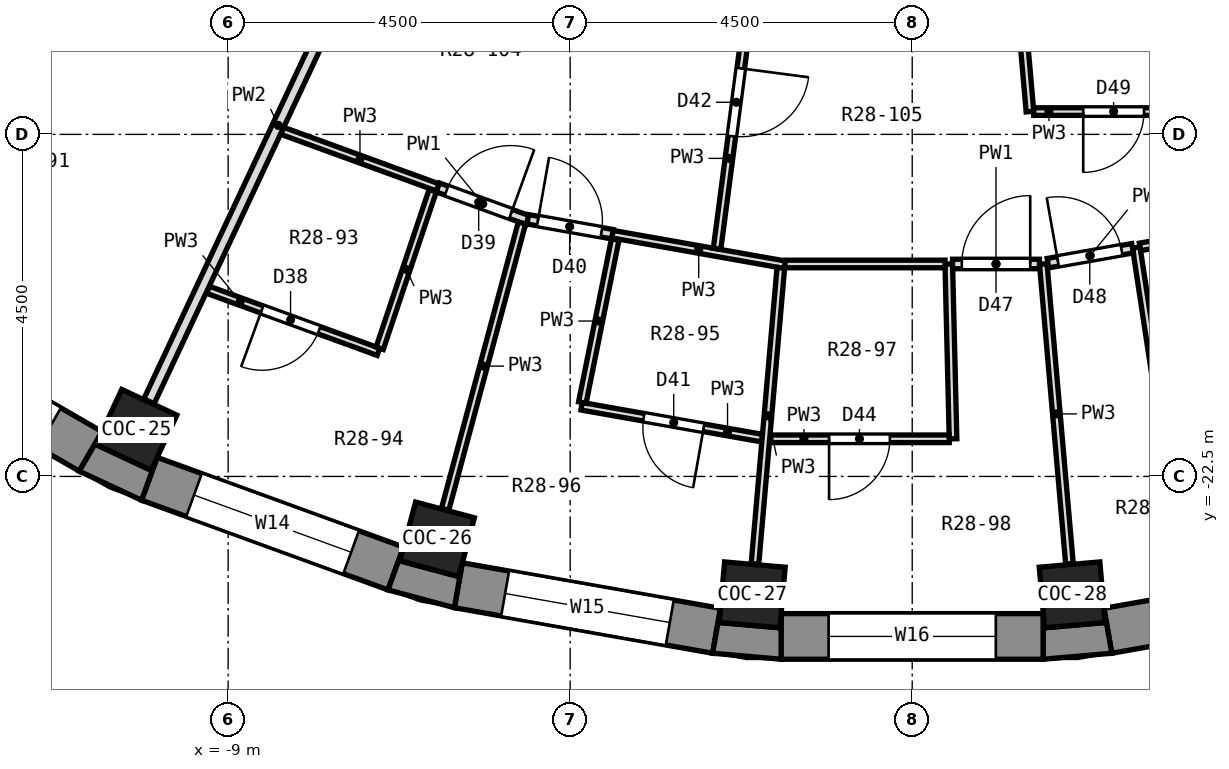
"""IFC4 building model, lengths in metres.
Left out: names, types, materials, properties, quantities, classifications, styles, units other than length and angle.
Written with IfcOpenShell. Run it as: python <this file> out.ifc"""

import sys

from ifc_helpers import new_model, si_unit, direction, frame, frame_2d, origin, origin_2d, place, context, subcontext, project, spatial, polyline, rectangle, outline, extrude, element, fill, save


model = new_model("IFC4")
c1 = context("Model", 3, precision=1e-05, world=origin(), true_north=direction((0.0, 1.0)))
c2 = subcontext(c1, "Body", "Model", "MODEL_VIEW")
j1 = project(units=[si_unit("LENGTHUNIT", "METRE"), si_unit("PLANEANGLEUNIT", "RADIAN")], contexts=[c1])
p1 = place(None, origin())
s1 = spatial("IfcSite", under=j1, at=p1, CompositionType="ELEMENT")
p2 = place(p1, origin())
s2 = spatial("IfcBuilding", under=s1, at=p2, CompositionType="ELEMENT")
p3 = place(p2, frame((0.0, 0.0, 190.5)))
s3 = spatial("IfcBuildingStorey", under=s2, at=p3, CompositionType="ELEMENT", Elevation=190.5)
for number, where, z_axis, x_axis in (
    (1, (-10.206, -21.887, 0.0), (0.0, 0.0, 1.0), (-0.423, -0.906, 0.0)),
    (2, (-6.25, -23.327, 0.0), (0.0, 0.0, 1.0), (-0.259, -0.966, 0.0)),
    (3, (-2.105, -24.058, 0.0), (0.0, 0.0, 1.0), (-0.087, -0.996, 0.0)),
    (4, (2.105, -24.058, 0.0), (0.0, 0.0, 1.0), (0.087, -0.996, 0.0)),
):
    element("IfcColumn", number, at=place(p3, frame(where, z_axis=z_axis, x_axis=x_axis)), inside=s3, PredefinedType="COLUMN", context=c2, shape_type="SweptSolid", body=[
        extrude(rectangle(XDim=0.8, YDim=0.8, at=origin_2d()), origin(), (0.0, 0.0, 1.0), 3.3),
    ])
p4 = place(p3, frame((-13.796, -20.446, 0.0), z_axis=(0.0, 0.0, 1.0), x_axis=(0.86602648383, -0.499998129301, 0.0)))
e5 = element("IfcWall", 5, at=p4, inside=s3, PredefinedType="SOLIDWALL", context=c2, shape_type="SweptSolid", body=[
    extrude(rectangle(XDim=3.45, YDim=0.6, at=frame_2d((1.725, 0.0))), origin(), (0.0, 0.0, 1.0), 2.85),
])
p5 = place(p4, frame((0.625, 0.0, 0.9)))
e6 = element("IfcOpeningElement", 6, at=p5, cuts=e5, PredefinedType="OPENING", context=c2, shape_type="SweptSolid", body=[
    extrude(rectangle(XDim=2.2, YDim=1.8, at=frame_2d((1.1, 0.9))), frame((0.0, 0.312, 0.0), z_axis=(0.0, -1.0, 0.0), x_axis=(1.0, 0.0, 0.0)), (0.0, 0.0, 1.0), 0.624),
])
p6 = place(p3, frame((-10.036, -22.531, 0.0), z_axis=(0.0, 0.0, 1.0), x_axis=(0.93968799822, -0.342032843455, 0.0)))
e7 = element("IfcWall", 7, at=p6, inside=s3, PredefinedType="SOLIDWALL", context=c2, shape_type="SweptSolid", body=[
    extrude(rectangle(XDim=3.45, YDim=0.6, at=frame_2d((1.725, 0.0))), origin(), (0.0, 0.0, 1.0), 2.85),
])
p7 = place(p6, frame((0.625, 0.0, 0.9)))
e8 = element("IfcOpeningElement", 8, at=p7, cuts=e7, PredefinedType="OPENING", context=c2, shape_type="SweptSolid", body=[
    extrude(rectangle(XDim=2.2, YDim=1.8, at=frame_2d((1.1, 0.9))), frame((0.0, 0.312, 0.0), z_axis=(0.0, -1.0, 0.0), x_axis=(1.0, 0.0, 0.0)), (0.0, 0.0, 1.0), 0.624),
])
p8 = place(p3, frame((-5.971, -23.932, 0.0), z_axis=(0.0, 0.0, 1.0), x_axis=(0.984814892183, -0.173607684551, 0.0)))
e9 = element("IfcWall", 9, at=p8, inside=s3, PredefinedType="SOLIDWALL", context=c2, shape_type="SweptSolid", body=[
    extrude(rectangle(XDim=3.45, YDim=0.6, at=frame_2d((1.725, 0.0))), origin(), (0.0, 0.0, 1.0), 2.85),
])
p9 = place(p8, frame((0.625, 0.0, 0.9)))
e10 = element("IfcOpeningElement", 10, at=p9, cuts=e9, PredefinedType="OPENING", context=c2, shape_type="SweptSolid", body=[
    extrude(rectangle(XDim=2.2, YDim=1.8, at=frame_2d((1.1, 0.9))), frame((0.0, 0.312, 0.0), z_axis=(0.0, -1.0, 0.0), x_axis=(1.0, 0.0, 0.0)), (0.0, 0.0, 1.0), 0.624),
])
p10 = place(p3, frame((-1.725, -24.605, 0.0), z_axis=(0.0, 0.0, 1.0), x_axis=(1.0, 0.0, 0.0)))
e11 = element("IfcWall", 11, at=p10, inside=s3, PredefinedType="SOLIDWALL", context=c2, shape_type="SweptSolid", body=[
    extrude(rectangle(XDim=3.45, YDim=0.6, at=frame_2d((1.725, 0.0))), origin(), (0.0, 0.0, 1.0), 2.85),
])
p11 = place(p10, frame((0.625, 0.0, 0.9)))
e12 = element("IfcOpeningElement", 12, at=p11, cuts=e11, PredefinedType="OPENING", context=c2, shape_type="SweptSolid", body=[
    extrude(rectangle(XDim=2.2, YDim=1.8, at=frame_2d((1.1, 0.9))), frame((0.0, 0.312, 0.0), z_axis=(0.0, -1.0, 0.0), x_axis=(1.0, 0.0, 0.0)), (0.0, 0.0, 1.0), 0.624),
])
p12 = place(p3, frame((2.574, -24.531, 0.0), z_axis=(0.0, 0.0, 1.0), x_axis=(0.984814892183, 0.173607684551, 0.0)))
e13 = element("IfcWall", 13, at=p12, inside=s3, PredefinedType="SOLIDWALL", context=c2, shape_type="SweptSolid", body=[
    extrude(rectangle(XDim=3.45, YDim=0.6, at=frame_2d((1.725, 0.0))), origin(), (0.0, 0.0, 1.0), 2.85),
])
p13 = place(p12, frame((0.625, 0.0, 0.9)))
e14 = element("IfcOpeningElement", 14, at=p13, cuts=e13, PredefinedType="OPENING", context=c2, shape_type="SweptSolid", body=[
    extrude(rectangle(XDim=2.2, YDim=1.8, at=frame_2d((1.1, 0.9))), frame((0.0, 0.312, 0.0), z_axis=(0.0, -1.0, 0.0), x_axis=(1.0, 0.0, 0.0)), (0.0, 0.0, 1.0), 0.624),
])
p14 = place(p3, origin())
e15 = element("IfcWall", 15, at=p14, inside=s3, PredefinedType="SOLIDWALL", context=c2, shape_type="SweptSolid", body=[
    extrude(outline(polyline([(-10.139, -22.813), (-9.934, -22.249), (-10.013, -22.419), (-10.738, -22.081), (-10.659, -21.911), (-10.959, -22.431), (-10.139, -22.813)])), origin(), (0.0, 0.0, 1.0), 2.85),
])
p15 = place(p3, origin())
e16 = element("IfcWall", 16, at=p15, inside=s3, PredefinedType="SOLIDWALL", context=c2, shape_type="SweptSolid", body=[
    extrude(outline(polyline([(-6.023, -24.227), (-5.919, -23.636), (-5.968, -23.817), (-6.74, -23.61), (-6.692, -23.429), (-6.897, -23.993), (-6.023, -24.227)])), origin(), (0.0, 0.0, 1.0), 2.85),
])
p16 = place(p3, origin())
e17 = element("IfcWall", 17, at=p16, inside=s3, PredefinedType="SOLIDWALL", context=c2, shape_type="SweptSolid", body=[
    extrude(outline(polyline([(-2.626, -24.826), (-1.725, -24.905), (-1.725, -24.305), (-1.741, -24.491), (-2.538, -24.422), (-2.522, -24.235), (-2.626, -24.826)])), origin(), (0.0, 0.0, 1.0), 2.85),
])
p17 = place(p3, origin())
e18 = element("IfcWall", 18, at=p17, inside=s3, PredefinedType="SOLIDWALL", context=c2, shape_type="SweptSolid", body=[
    extrude(outline(polyline([(1.725, -24.905), (2.626, -24.826), (2.522, -24.235), (2.538, -24.422), (1.741, -24.491), (1.725, -24.305), (1.725, -24.905)])), origin(), (0.0, 0.0, 1.0), 2.85),
])
p18 = place(p3, frame((0.481, -19.705, 0.0), z_axis=(0.0, 0.0, 1.0), x_axis=(0.024408861322, -0.99970205936, 0.0)))
e19 = element("IfcWall", 19, at=p18, inside=s3, PredefinedType="PARTITIONING", context=c2, shape_type="SweptSolid", body=[
    extrude(rectangle(XDim=2.301, YDim=0.1, at=frame_2d((1.15, 0.0))), origin(), (0.0, 0.0, 1.0), 2.85),
])
p19 = place(p3, frame((1.371, -15.662, 0.0), z_axis=(0.0, 0.0, 1.0), x_axis=(0.087124015283, -0.996197473376, 0.0)))
e20 = element("IfcWall", 20, at=p19, inside=s3, PredefinedType="PARTITIONING", context=c2, shape_type="SweptSolid", body=[
    extrude(rectangle(XDim=2.046, YDim=0.1, at=frame_2d((1.023, 0.0))), origin(), (0.0, 0.0, 1.0), 2.85),
])
p20 = place(p3, frame((1.724, -19.705, 0.0), z_axis=(0.0, 0.0, 1.0), x_axis=(0.087060633562, -0.996203014492, 0.0)))
e21 = element("IfcWall", 21, at=p20, inside=s3, PredefinedType="PARTITIONING", context=c2, shape_type="SweptSolid", body=[
    extrude(rectangle(XDim=3.96, YDim=0.1, at=frame_2d((1.98, 0.0))), origin(), (0.0, 0.0, 1.0), 2.85),
])
p21 = place(p3, frame((2.948, -19.489, 0.0), z_axis=(0.0, 0.0, 1.0), x_axis=(0.149927962289, -0.98869692329, 0.0)))
e22 = element("IfcWall", 22, at=p21, inside=s3, PredefinedType="PARTITIONING", context=c2, shape_type="SweptSolid", body=[
    extrude(rectangle(XDim=2.301, YDim=0.1, at=frame_2d((1.15, 0.0))), origin(), (0.0, 0.0, 1.0), 2.85),
])
p22 = place(p3, frame((-9.264, -20.045, 0.0), z_axis=(0.0, 0.0, 1.0), x_axis=(0.939661926998, -0.342104462045, 0.0)))
e23 = element("IfcWall", 23, at=p22, inside=s3, PredefinedType="PARTITIONING", context=c2, shape_type="SweptSolid", body=[
    extrude(rectangle(XDim=2.386, YDim=0.1, at=frame_2d((1.193, 0.0))), origin(), (0.0, 0.0, 1.0), 2.85),
])
p23 = place(p22, frame((0.756, 0.0, 0.0)))
e24 = element("IfcOpeningElement", 24, at=p23, cuts=e23, PredefinedType="OPENING", context=c2, shape_type="SweptSolid", body=[
    extrude(rectangle(XDim=0.8, YDim=2.1, at=frame_2d((0.4, 1.05))), frame((0.0, 0.062, 0.0), z_axis=(0.0, -1.0, 0.0), x_axis=(1.0, 0.0, 0.0)), (0.0, 0.0, 1.0), 0.124),
])
p24 = place(p3, frame((-8.289, -17.953, 0.0), z_axis=(0.0, 0.0, 1.0), x_axis=(0.939678877388, -0.34205790064, 0.0)))
e25 = element("IfcWall", 25, at=p24, inside=s3, PredefinedType="PARTITIONING", context=c2, shape_type="SweptSolid", body=[
    extrude(rectangle(XDim=2.179, YDim=0.1, at=frame_2d((1.089, 0.0))), origin(), (0.0, 0.0, 1.0), 2.85),
])
p25 = place(p3, frame((-6.241, -18.698, 0.0), z_axis=(0.0, 0.0, 1.0), x_axis=(0.939793423488, -0.341743063087, 0.0)))
e26 = element("IfcWall", 26, at=p25, inside=s3, PredefinedType="PARTITIONING", context=c2, shape_type="SweptSolid", body=[
    extrude(rectangle(XDim=1.257, YDim=0.125, at=frame_2d((0.629, 0.0))), origin(), (0.0, 0.0, 1.0), 2.85),
])
p26 = place(p25, frame((0.122, 0.0, 0.0)))
e27 = element("IfcOpeningElement", 27, at=p26, cuts=e26, PredefinedType="OPENING", context=c2, shape_type="SweptSolid", body=[
    extrude(rectangle(XDim=0.9, YDim=2.1, at=frame_2d((0.45, 1.05))), frame((0.0, 0.074, 0.0), z_axis=(0.0, -1.0, 0.0), x_axis=(1.0, 0.0, 0.0)), (0.0, 0.0, 1.0), 0.149),
])
p27 = place(p3, frame((-3.944, -19.313, 0.0), z_axis=(0.0, 0.0, 1.0), x_axis=(0.984635015371, -0.174624988207, 0.0)))
e28 = element("IfcWall", 28, at=p27, inside=s3, PredefinedType="PARTITIONING", context=c2, shape_type="SweptSolid", body=[
    extrude(rectangle(XDim=2.305, YDim=0.1, at=frame_2d((1.153, 0.0))), origin(), (0.0, 0.0, 1.0), 2.85),
])
p28 = place(p3, frame((-4.35, -21.577, 0.0), z_axis=(0.0, 0.0, 1.0), x_axis=(0.984773370293, -0.173843058997, 0.0)))
e29 = element("IfcWall", 29, at=p28, inside=s3, PredefinedType="PARTITIONING", context=c2, shape_type="SweptSolid", body=[
    extrude(rectangle(XDim=2.413, YDim=0.1, at=frame_2d((1.206, 0.0))), origin(), (0.0, 0.0, 1.0), 2.85),
])
p29 = place(p28, frame((0.831, 0.0, 0.0)))
e30 = element("IfcOpeningElement", 30, at=p29, cuts=e29, PredefinedType="OPENING", context=c2, shape_type="SweptSolid", body=[
    extrude(rectangle(XDim=0.8, YDim=2.1, at=frame_2d((0.4, 1.05))), frame((0.0, 0.062, 0.0), z_axis=(0.0, -1.0, 0.0), x_axis=(1.0, 0.0, 0.0)), (0.0, 0.0, 1.0), 0.124),
])
p30 = place(p3, frame((-5.057, -19.117, 0.0), z_axis=(0.0, 0.0, 1.0), x_axis=(0.984803124218, -0.17367442682, 0.0)))
e31 = element("IfcWall", 31, at=p30, inside=s3, PredefinedType="PARTITIONING", context=c2, shape_type="SweptSolid", body=[
    extrude(rectangle(XDim=1.13, YDim=0.125, at=frame_2d((0.565, 0.0))), origin(), (0.0, 0.0, 1.0), 2.85),
])
p31 = place(p30, frame((0.134, 0.0, 0.0)))
e32 = element("IfcOpeningElement", 32, at=p31, cuts=e31, PredefinedType="OPENING", context=c2, shape_type="SweptSolid", body=[
    extrude(rectangle(XDim=0.85, YDim=2.1, at=frame_2d((0.425, 1.05))), frame((0.0, 0.074, 0.0), z_axis=(0.0, -1.0, 0.0), x_axis=(1.0, 0.0, 0.0)), (0.0, 0.0, 1.0), 0.149),
])
p32 = place(p3, frame((-1.875, -22.005, 0.0), z_axis=(0.0, 0.0, 1.0), x_axis=(1.0, 0.0, 0.0)))
e33 = element("IfcWall", 33, at=p32, inside=s3, PredefinedType="PARTITIONING", context=c2, shape_type="SweptSolid", body=[
    extrude(rectangle(XDim=2.362, YDim=0.1, at=frame_2d((1.181, 0.0))), origin(), (0.0, 0.0, 1.0), 2.85),
])
p33 = place(p32, frame((0.781, 0.0, 0.0)))
e34 = element("IfcOpeningElement", 34, at=p33, cuts=e33, PredefinedType="OPENING", context=c2, shape_type="SweptSolid", body=[
    extrude(rectangle(XDim=0.8, YDim=2.1, at=frame_2d((0.4, 1.05))), frame((0.0, 0.062, 0.0), z_axis=(0.0, -1.0, 0.0), x_axis=(1.0, 0.0, 0.0)), (0.0, 0.0, 1.0), 0.124),
])
p34 = place(p3, frame((-1.674, -19.705, 0.0), z_axis=(0.0, 0.0, 1.0), x_axis=(1.0, 0.0, 0.0)))
e35 = element("IfcWall", 35, at=p34, inside=s3, PredefinedType="PARTITIONING", context=c2, shape_type="SweptSolid", body=[
    extrude(rectangle(XDim=2.105, YDim=0.1, at=frame_2d((1.052, 0.0))), origin(), (0.0, 0.0, 1.0), 2.85),
])
p35 = place(p3, frame((0.531, -19.705, 0.0), z_axis=(0.0, 0.0, 1.0), x_axis=(1.0, 0.0, 0.0)))
e36 = element("IfcWall", 36, at=p35, inside=s3, PredefinedType="PARTITIONING", context=c2, shape_type="SweptSolid", body=[
    extrude(rectangle(XDim=1.143, YDim=0.125, at=frame_2d((0.572, 0.0))), origin(), (0.0, 0.0, 1.0), 2.85),
])
p36 = place(p35, frame((0.122, 0.0, 0.0)))
e37 = element("IfcOpeningElement", 37, at=p36, cuts=e36, PredefinedType="OPENING", context=c2, shape_type="SweptSolid", body=[
    extrude(rectangle(XDim=0.9, YDim=2.1, at=frame_2d((0.45, 1.05))), frame((0.0, 0.074, 0.0), z_axis=(0.0, -1.0, 0.0), x_axis=(1.0, 0.0, 0.0)), (0.0, 0.0, 1.0), 0.149),
])
p37 = place(p3, frame((1.599, -17.7, 0.0), z_axis=(0.0, 0.0, 1.0), x_axis=(1.0, 0.0, 0.0)))
e38 = element("IfcWall", 38, at=p37, inside=s3, PredefinedType="PARTITIONING", context=c2, shape_type="SweptSolid", body=[
    extrude(rectangle(XDim=2.101, YDim=0.1, at=frame_2d((1.05, 0.0))), origin(), (0.0, 0.0, 1.0), 2.85),
])
p38 = place(p37, frame((0.65, 0.0, 0.0)))
e39 = element("IfcOpeningElement", 39, at=p38, cuts=e38, PredefinedType="OPENING", context=c2, shape_type="SweptSolid", body=[
    extrude(rectangle(XDim=0.8, YDim=2.1, at=frame_2d((0.4, 1.05))), frame((0.0, 0.062, 0.0), z_axis=(0.0, -1.0, 0.0), x_axis=(1.0, 0.0, 0.0)), (0.0, 0.0, 1.0), 0.124),
])
p39 = place(p3, frame((2.997, -19.48, 0.0), z_axis=(0.0, 0.0, 1.0), x_axis=(0.984804573467, 0.173666208797, 0.0)))
e40 = element("IfcWall", 40, at=p39, inside=s3, PredefinedType="PARTITIONING", context=c2, shape_type="SweptSolid", body=[
    extrude(rectangle(XDim=2.104, YDim=0.1, at=frame_2d((1.052, 0.0))), origin(), (0.0, 0.0, 1.0), 2.85),
])
p40 = place(p3, frame((1.786, -19.694, 0.0), z_axis=(0.0, 0.0, 1.0), x_axis=(0.984803124218, 0.17367442682, 0.0)))
e41 = element("IfcWall", 41, at=p40, inside=s3, PredefinedType="PARTITIONING", context=c2, shape_type="SweptSolid", body=[
    extrude(rectangle(XDim=1.13, YDim=0.125, at=frame_2d((0.565, 0.0))), origin(), (0.0, 0.0, 1.0), 2.85),
])
p41 = place(p40, frame((0.134, 0.0, 0.0)))
e42 = element("IfcOpeningElement", 42, at=p41, cuts=e41, PredefinedType="OPENING", context=c2, shape_type="SweptSolid", body=[
    extrude(rectangle(XDim=0.85, YDim=2.1, at=frame_2d((0.425, 1.05))), frame((0.0, 0.074, 0.0), z_axis=(0.0, -1.0, 0.0), x_axis=(1.0, 0.0, 0.0)), (0.0, 0.0, 1.0), 0.149),
])
p42 = place(p3, frame((-10.041, -21.512, 0.0), z_axis=(0.0, 0.0, 1.0), x_axis=(0.424428415396, 0.905461495705, 0.0)))
e43 = element("IfcWall", 43, at=p42, inside=s3, PredefinedType="PARTITIONING", context=c2, shape_type="SweptSolid", body=[
    extrude(rectangle(XDim=8.018, YDim=0.15, at=frame_2d((4.009, 0.0))), origin(), (0.0, 0.0, 1.0), 2.85),
])
p43 = place(p3, frame((-7.006, -20.814, 0.0), z_axis=(0.0, 0.0, 1.0), x_axis=(0.319138695408, 0.947708021014, 0.0)))
e44 = element("IfcWall", 44, at=p43, inside=s3, PredefinedType="PARTITIONING", context=c2, shape_type="SweptSolid", body=[
    extrude(rectangle(XDim=2.188, YDim=0.1, at=frame_2d((1.094, 0.0))), origin(), (0.0, 0.0, 1.0), 2.85),
])
p44 = place(p3, frame((-6.145, -22.931, 0.0), z_axis=(0.0, 0.0, 1.0), x_axis=(0.259139967725, 0.965839778186, 0.0)))
e45 = element("IfcWall", 45, at=p44, inside=s3, PredefinedType="PARTITIONING", context=c2, shape_type="SweptSolid", body=[
    extrude(rectangle(XDim=3.897, YDim=0.1, at=frame_2d((1.949, 0.0))), origin(), (0.0, 0.0, 1.0), 2.85),
])
p45 = place(p3, frame((-4.34, -21.528, 0.0), z_axis=(0.0, 0.0, 1.0), x_axis=(0.197725242549, 0.980257480695, 0.0)))
e46 = element("IfcWall", 46, at=p45, inside=s3, PredefinedType="PARTITIONING", context=c2, shape_type="SweptSolid", body=[
    extrude(rectangle(XDim=2.188, YDim=0.1, at=frame_2d((1.094, 0.0))), origin(), (0.0, 0.0, 1.0), 2.85),
])
p46 = place(p3, frame((-2.567, -19.505, 0.0), z_axis=(0.0, 0.0, 1.0), x_axis=(0.130303001962, 0.991474219372, 0.0)))
e47 = element("IfcWall", 47, at=p46, inside=s3, PredefinedType="PARTITIONING", context=c2, shape_type="SweptSolid", body=[
    extrude(rectangle(XDim=3.876, YDim=0.1, at=frame_2d((1.938, 0.0))), origin(), (0.0, 0.0, 1.0), 2.85),
])
p47 = place(p46, frame((1.494, 0.0, 0.0)))
e48 = element("IfcOpeningElement", 48, at=p47, cuts=e47, PredefinedType="OPENING", context=c2, shape_type="SweptSolid", body=[
    extrude(rectangle(XDim=0.9, YDim=2.1, at=frame_2d((0.45, 1.05))), frame((0.0, 0.062, 0.0), z_axis=(0.0, -1.0, 0.0), x_axis=(1.0, 0.0, 0.0)), (0.0, 0.0, 1.0), 0.124),
])
p48 = place(p3, frame((-2.069, -23.65, 0.0), z_axis=(0.0, 0.0, 1.0), x_axis=(0.087111950553, 0.996198528442, 0.0)))
e49 = element("IfcWall", 49, at=p48, inside=s3, PredefinedType="PARTITIONING", context=c2, shape_type="SweptSolid", body=[
    extrude(rectangle(XDim=3.91, YDim=0.1, at=frame_2d((1.955, 0.0))), origin(), (0.0, 0.0, 1.0), 2.85),
])
p49 = place(p5, origin())
e50 = element("IfcWindow", 50, at=p49, inside=s3, PartitioningType="SINGLE_PANEL", PredefinedType="WINDOW", context=c2, shape_type="SweptSolid", body=[
    extrude(rectangle(XDim=2.2, YDim=1.8, at=frame_2d((1.1, 0.9))), frame((0.0, 0.18, 0.0), z_axis=(0.0, -1.0, 0.0), x_axis=(1.0, 0.0, 0.0)), (0.0, 0.0, 1.0), 0.06),
])
fill(e6, e50)
p50 = place(p7, origin())
e51 = element("IfcWindow", 51, at=p50, inside=s3, PartitioningType="SINGLE_PANEL", PredefinedType="WINDOW", context=c2, shape_type="SweptSolid", body=[
    extrude(rectangle(XDim=2.2, YDim=1.8, at=frame_2d((1.1, 0.9))), frame((0.0, 0.18, 0.0), z_axis=(0.0, -1.0, 0.0), x_axis=(1.0, 0.0, 0.0)), (0.0, 0.0, 1.0), 0.06),
])
fill(e8, e51)
p51 = place(p9, origin())
e52 = element("IfcWindow", 52, at=p51, inside=s3, PartitioningType="SINGLE_PANEL", PredefinedType="WINDOW", context=c2, shape_type="SweptSolid", body=[
    extrude(rectangle(XDim=2.2, YDim=1.8, at=frame_2d((1.1, 0.9))), frame((0.0, 0.18, 0.0), z_axis=(0.0, -1.0, 0.0), x_axis=(1.0, 0.0, 0.0)), (0.0, 0.0, 1.0), 0.06),
])
fill(e10, e52)
p52 = place(p11, origin())
e53 = element("IfcWindow", 53, at=p52, inside=s3, PartitioningType="SINGLE_PANEL", PredefinedType="WINDOW", context=c2, shape_type="SweptSolid", body=[
    extrude(rectangle(XDim=2.2, YDim=1.8, at=frame_2d((1.1, 0.9))), frame((0.0, 0.18, 0.0), z_axis=(0.0, -1.0, 0.0), x_axis=(1.0, 0.0, 0.0)), (0.0, 0.0, 1.0), 0.06),
])
fill(e12, e53)
p53 = place(p23, frame((0.8, 0.0, 0.0), z_axis=(0.0, 0.0, 1.0), x_axis=(-1.0, 0.0, 0.0)))
e54 = element("IfcDoor", 54, at=p53, inside=s3, OperationType="SINGLE_SWING_RIGHT", PredefinedType="DOOR", context=c2, shape_type="SweptSolid", body=[
    extrude(rectangle(XDim=0.8, YDim=2.1, at=frame_2d((0.4, 1.05))), frame((0.0, 0.025, 0.0), z_axis=(0.0, -1.0, 0.0), x_axis=(1.0, 0.0, 0.0)), (0.0, 0.0, 1.0), 0.05),
])
fill(e24, e54)
p54 = place(p26, origin())
e55 = element("IfcDoor", 55, at=p54, inside=s3, OperationType="SINGLE_SWING_RIGHT", PredefinedType="DOOR", context=c2, shape_type="SweptSolid", body=[
    extrude(rectangle(XDim=0.9, YDim=2.1, at=frame_2d((0.45, 1.05))), frame((0.0, 0.025, 0.0), z_axis=(0.0, -1.0, 0.0), x_axis=(1.0, 0.0, 0.0)), (0.0, 0.0, 1.0), 0.05),
])
fill(e27, e55)
p55 = place(p31, origin())
e56 = element("IfcDoor", 56, at=p55, inside=s3, OperationType="SINGLE_SWING_LEFT", PredefinedType="DOOR", context=c2, shape_type="SweptSolid", body=[
    extrude(rectangle(XDim=0.85, YDim=2.1, at=frame_2d((0.425, 1.05))), frame((0.0, 0.025, 0.0), z_axis=(0.0, -1.0, 0.0), x_axis=(1.0, 0.0, 0.0)), (0.0, 0.0, 1.0), 0.05),
])
fill(e32, e56)
p56 = place(p29, frame((0.8, 0.0, 0.0), z_axis=(0.0, 0.0, 1.0), x_axis=(-1.0, 0.0, 0.0)))
e57 = element("IfcDoor", 57, at=p56, inside=s3, OperationType="SINGLE_SWING_LEFT", PredefinedType="DOOR", context=c2, shape_type="SweptSolid", body=[
    extrude(rectangle(XDim=0.8, YDim=2.1, at=frame_2d((0.4, 1.05))), frame((0.0, 0.025, 0.0), z_axis=(0.0, -1.0, 0.0), x_axis=(1.0, 0.0, 0.0)), (0.0, 0.0, 1.0), 0.05),
])
fill(e30, e57)
p57 = place(p47, frame((0.9, 0.0, 0.0), z_axis=(0.0, 0.0, 1.0), x_axis=(-1.0, 0.0, 0.0)))
e58 = element("IfcDoor", 58, at=p57, inside=s3, OperationType="SINGLE_SWING_LEFT", PredefinedType="DOOR", context=c2, shape_type="SweptSolid", body=[
    extrude(rectangle(XDim=0.9, YDim=2.1, at=frame_2d((0.45, 1.05))), frame((0.0, 0.025, 0.0), z_axis=(0.0, -1.0, 0.0), x_axis=(1.0, 0.0, 0.0)), (0.0, 0.0, 1.0), 0.05),
])
fill(e48, e58)
p58 = place(p33, frame((0.8, 0.0, 0.0), z_axis=(0.0, 0.0, 1.0), x_axis=(-1.0, 0.0, 0.0)))
e59 = element("IfcDoor", 59, at=p58, inside=s3, OperationType="SINGLE_SWING_RIGHT", PredefinedType="DOOR", context=c2, shape_type="SweptSolid", body=[
    extrude(rectangle(XDim=0.8, YDim=2.1, at=frame_2d((0.4, 1.05))), frame((0.0, 0.025, 0.0), z_axis=(0.0, -1.0, 0.0), x_axis=(1.0, 0.0, 0.0)), (0.0, 0.0, 1.0), 0.05),
])
fill(e34, e59)
p59 = place(p36, origin())
e60 = element("IfcDoor", 60, at=p59, inside=s3, OperationType="SINGLE_SWING_RIGHT", PredefinedType="DOOR", context=c2, shape_type="SweptSolid", body=[
    extrude(rectangle(XDim=0.9, YDim=2.1, at=frame_2d((0.45, 1.05))), frame((0.0, 0.025, 0.0), z_axis=(0.0, -1.0, 0.0), x_axis=(1.0, 0.0, 0.0)), (0.0, 0.0, 1.0), 0.05),
])
fill(e37, e60)
p60 = place(p41, origin())
e61 = element("IfcDoor", 61, at=p60, inside=s3, OperationType="SINGLE_SWING_LEFT", PredefinedType="DOOR", context=c2, shape_type="SweptSolid", body=[
    extrude(rectangle(XDim=0.85, YDim=2.1, at=frame_2d((0.425, 1.05))), frame((0.0, 0.025, 0.0), z_axis=(0.0, -1.0, 0.0), x_axis=(1.0, 0.0, 0.0)), (0.0, 0.0, 1.0), 0.05),
])
fill(e42, e61)
p61 = place(p38, frame((0.8, 0.0, 0.0), z_axis=(0.0, 0.0, 1.0), x_axis=(-1.0, 0.0, 0.0)))
e62 = element("IfcDoor", 62, at=p61, inside=s3, OperationType="SINGLE_SWING_RIGHT", PredefinedType="DOOR", context=c2, shape_type="SweptSolid", body=[
    extrude(rectangle(XDim=0.8, YDim=2.1, at=frame_2d((0.4, 1.05))), frame((0.0, 0.025, 0.0), z_axis=(0.0, -1.0, 0.0), x_axis=(1.0, 0.0, 0.0)), (0.0, 0.0, 1.0), 0.05),
])
fill(e39, e62)
save(model, sys.argv[1])
